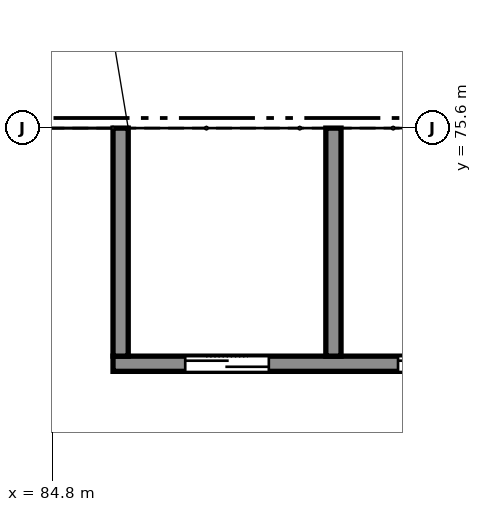
"""IFC4 building model, lengths in metres.
Left out: names, types, materials, properties, quantities, classifications, styles, units other than length and angle.
Written with IfcOpenShell. Run it as: python <this file> out.ifc"""

import sys

from ifc_helpers import new_model, si_unit, direction, frame, frame_2d, origin, place, context, subcontext, project, spatial, rectangle, extrude, element, fill, save


model = new_model("IFC4")
c1 = context("Model", 3, precision=1e-05, world=origin(), true_north=direction((0.0, 1.0)))
c2 = subcontext(c1, "Body", "Model", "MODEL_VIEW")
j1 = project(units=[si_unit("LENGTHUNIT", "METRE"), si_unit("PLANEANGLEUNIT", "RADIAN")], contexts=[c1])
p1 = place(None, origin())
s1 = spatial("IfcSite", under=j1, at=p1, CompositionType="ELEMENT")
p2 = place(p1, origin())
s2 = spatial("IfcBuilding", under=s1, at=p2, CompositionType="ELEMENT")
p3 = place(p2, frame((0.0, 0.0, 30.0)))
s3 = spatial("IfcBuildingStorey", under=s2, at=p3, CompositionType="ELEMENT", Elevation=30.0)
p4 = place(p3, frame((85.6, 72.5, 0.0), z_axis=(0.0, 0.0, 1.0), x_axis=(1.0, 0.0, 0.0)))
e1 = element("IfcWall", 1, at=p4, inside=s3, PredefinedType="SHEAR", context=c2, shape_type="SweptSolid", body=[
    extrude(rectangle(XDim=8.6, YDim=0.2, at=frame_2d((4.3, 0.0))), origin(), (0.0, 0.0, 1.0), 5.0),
])
p5 = place(p4, frame((0.95, 0.0, 0.0)))
e2 = element("IfcOpeningElement", 2, at=p5, cuts=e1, PredefinedType="OPENING", context=c2, shape_type="SweptSolid", body=[
    extrude(rectangle(XDim=1.1, YDim=2.1, at=frame_2d((0.55, 1.05))), frame((0.0, 0.11, 0.0), z_axis=(0.0, -1.0, 0.0), x_axis=(1.0, 0.0, 0.0)), (0.0, 0.0, 1.0), 0.22),
])
p6 = place(p4, frame((3.75, 0.0, 0.0)))
e3 = element("IfcOpeningElement", 3, at=p6, cuts=e1, PredefinedType="OPENING", context=c2, shape_type="SweptSolid", body=[
    extrude(rectangle(XDim=1.1, YDim=2.1, at=frame_2d((0.55, 1.05))), frame((0.0, 0.11, 0.0), z_axis=(0.0, -1.0, 0.0), x_axis=(1.0, 0.0, 0.0)), (0.0, 0.0, 1.0), 0.22),
])
p7 = place(p4, frame((6.55, 0.0, 0.0)))
e4 = element("IfcOpeningElement", 4, at=p7, cuts=e1, PredefinedType="OPENING", context=c2, shape_type="SweptSolid", body=[
    extrude(rectangle(XDim=1.1, YDim=2.1, at=frame_2d((0.55, 1.05))), frame((0.0, 0.11, 0.0), z_axis=(0.0, -1.0, 0.0), x_axis=(1.0, 0.0, 0.0)), (0.0, 0.0, 1.0), 0.22),
])
for number, where, z_axis, x_axis in (
    (5, (85.7, 72.6, 0.0), (0.0, 0.0, 1.0), (0.0, 1.0, 0.0)),
    (6, (88.5, 72.6, 0.0), (0.0, 0.0, 1.0), (0.0, 1.0, 0.0)),
):
    element("IfcWall", number, at=place(p3, frame(where, z_axis=z_axis, x_axis=x_axis)), inside=s3, PredefinedType="SHEAR", context=c2, shape_type="SweptSolid", body=[
        extrude(rectangle(XDim=3.0, YDim=0.2, at=frame_2d((1.5, 0.0))), origin(), (0.0, 0.0, 1.0), 5.0),
    ])
p8 = place(p5, origin())
e7 = element("IfcDoor", 7, at=p8, inside=s3, OperationType="DOUBLE_DOOR_SLIDING", PredefinedType="DOOR", context=c2, shape_type="SweptSolid", body=[
    extrude(rectangle(XDim=1.1, YDim=2.1, at=frame_2d((0.55, 1.05))), frame((0.0, 0.025, 0.0), z_axis=(0.0, -1.0, 0.0), x_axis=(1.0, 0.0, 0.0)), (0.0, 0.0, 1.0), 0.05),
])
fill(e2, e7)
p9 = place(p6, origin())
e8 = element("IfcDoor", 8, at=p9, inside=s3, OperationType="DOUBLE_DOOR_SLIDING", PredefinedType="DOOR", context=c2, shape_type="SweptSolid", body=[
    extrude(rectangle(XDim=1.1, YDim=2.1, at=frame_2d((0.55, 1.05))), frame((0.0, 0.025, 0.0), z_axis=(0.0, -1.0, 0.0), x_axis=(1.0, 0.0, 0.0)), (0.0, 0.0, 1.0), 0.05),
])
fill(e3, e8)
save(model, sys.argv[1])
